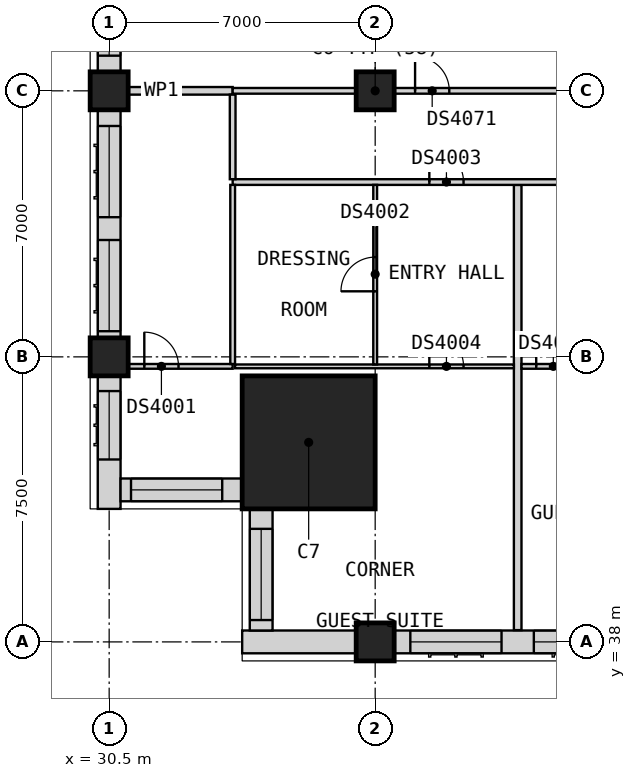
"""IFC4 building model, lengths in metres.
Left out: names, types, materials, properties, quantities, classifications, styles, units other than length and angle.
Written with IfcOpenShell. Run it as: python <this file> out.ifc"""

import sys

from ifc_helpers import new_model, si_unit, direction, frame, frame_2d, origin, origin_2d, place, context, subcontext, project, spatial, rectangle, extrude, element, fill, save


model = new_model("IFC4")
c1 = context("Model", 3, precision=1e-05, world=origin(), true_north=direction((0.0, 1.0)))
c2 = subcontext(c1, "Body", "Model", "MODEL_VIEW")
j1 = project(units=[si_unit("LENGTHUNIT", "METRE"), si_unit("PLANEANGLEUNIT", "RADIAN")], contexts=[c1])
p1 = place(None, origin())
s1 = spatial("IfcSite", under=j1, at=p1, CompositionType="ELEMENT")
p2 = place(p1, origin())
s2 = spatial("IfcBuilding", under=s1, at=p2, CompositionType="ELEMENT")
p3 = place(p2, frame((0.0, 0.0, 141.0)))
s3 = spatial("IfcBuildingStorey", under=s2, at=p3, CompositionType="ELEMENT", Elevation=141.0)
for number, where, z_axis, x_axis in (
    (1, (30.5, 45.5, 0.0), (0.0, 0.0, 1.0), (1.0, 0.0, 0.0)),
    (2, (30.5, 52.5, 0.0), (0.0, 0.0, 1.0), (1.0, 0.0, 0.0)),
    (3, (37.5, 38.0, 0.0), (0.0, 0.0, 1.0), (1.0, 0.0, 0.0)),
    (4, (37.5, 52.5, 0.0), (0.0, 0.0, 1.0), (1.0, 0.0, 0.0)),
):
    element("IfcColumn", number, at=place(p3, frame(where, z_axis=z_axis, x_axis=x_axis)), inside=s3, PredefinedType="COLUMN", context=c2, shape_type="SweptSolid", body=[
        extrude(rectangle(XDim=1.0, YDim=1.0, at=origin_2d()), origin(), (0.0, 0.0, 1.0), 3.6),
    ])
p4 = place(p3, frame((35.75, 43.25, 0.0), z_axis=(0.0, 0.0, 1.0), x_axis=(1.0, 0.0, 0.0)))
e5 = element("IfcColumn", 5, at=p4, inside=s3, PredefinedType="COLUMN", context=c2, shape_type="SweptSolid", body=[
    extrude(rectangle(XDim=3.5, YDim=3.5, at=origin_2d()), origin(), (0.0, 0.0, 1.0), 3.6),
])
p5 = place(p3, frame((34.0, 38.0, 0.0), z_axis=(0.0, 0.0, 1.0), x_axis=(1.0, 0.0, 0.0)))
e6 = element("IfcWall", 6, at=p5, inside=s3, PredefinedType="SOLIDWALL", context=c2, shape_type="SweptSolid", body=[
    extrude(rectangle(XDim=3.0, YDim=0.6, at=frame_2d((1.5, 0.0))), origin(), (0.0, 0.0, 1.0), 3.35),
])
p6 = place(p3, frame((38.0, 38.0, 0.0), z_axis=(0.0, 0.0, 1.0), x_axis=(1.0, 0.0, 0.0)))
e7 = element("IfcWall", 7, at=p6, inside=s3, PredefinedType="SOLIDWALL", context=c2, shape_type="SweptSolid", body=[
    extrude(rectangle(XDim=6.5, YDim=0.6, at=frame_2d((3.25, 0.0))), origin(), (0.0, 0.0, 1.0), 2.85),
])
p7 = place(p6, frame((0.425, 0.0, 0.8)))
e8 = element("IfcOpeningElement", 8, at=p7, cuts=e7, PredefinedType="OPENING", context=c2, shape_type="SweptSolid", body=[
    extrude(rectangle(XDim=2.4, YDim=1.8, at=frame_2d((1.2, 0.9))), frame((0.0, 0.31, 0.0), z_axis=(0.0, -1.0, 0.0), x_axis=(1.0, 0.0, 0.0)), (0.0, 0.0, 1.0), 0.62),
])
p8 = place(p6, frame((3.675, 0.0, 0.8)))
e9 = element("IfcOpeningElement", 9, at=p8, cuts=e7, PredefinedType="OPENING", context=c2, shape_type="SweptSolid", body=[
    extrude(rectangle(XDim=2.4, YDim=1.8, at=frame_2d((1.2, 0.9))), frame((0.0, 0.31, 0.0), z_axis=(0.0, -1.0, 0.0), x_axis=(1.0, 0.0, 0.0)), (0.0, 0.0, 1.0), 0.62),
])
p9 = place(p3, frame((30.5, 60.0, 0.0), z_axis=(0.0, 0.0, 1.0), x_axis=(0.0, -1.0, 0.0)))
e10 = element("IfcWall", 10, at=p9, inside=s3, PredefinedType="SOLIDWALL", context=c2, shape_type="SweptSolid", body=[
    extrude(rectangle(XDim=7.0, YDim=0.6, at=frame_2d((3.5, 0.0))), origin(), (0.0, 0.0, 1.0), 3.35),
])
p10 = place(p9, frame((4.175, 0.0, 0.8)))
e11 = element("IfcOpeningElement", 11, at=p10, cuts=e10, PredefinedType="OPENING", context=c2, shape_type="SweptSolid", body=[
    extrude(rectangle(XDim=2.4, YDim=1.8, at=frame_2d((1.2, 0.9))), frame((0.0, 0.31, 0.0), z_axis=(0.0, -1.0, 0.0), x_axis=(1.0, 0.0, 0.0)), (0.0, 0.0, 1.0), 0.62),
])
p11 = place(p9, frame((0.675, 0.0, 0.8)))
e12 = element("IfcOpeningElement", 12, at=p11, cuts=e10, PredefinedType="OPENING", context=c2, shape_type="SweptSolid", body=[
    extrude(rectangle(XDim=2.4, YDim=1.8, at=frame_2d((1.2, 0.9))), frame((0.0, 0.31, 0.0), z_axis=(0.0, -1.0, 0.0), x_axis=(1.0, 0.0, 0.0)), (0.0, 0.0, 1.0), 0.62),
])
p12 = place(p3, frame((30.5, 52.0, 0.0), z_axis=(0.0, 0.0, 1.0), x_axis=(0.0, -1.0, 0.0)))
e13 = element("IfcWall", 13, at=p12, inside=s3, PredefinedType="SOLIDWALL", context=c2, shape_type="SweptSolid", body=[
    extrude(rectangle(XDim=6.0, YDim=0.6, at=frame_2d((3.0, 0.0))), origin(), (0.0, 0.0, 1.0), 2.85),
])
p13 = place(p12, frame((3.425, 0.0, 0.8)))
e14 = element("IfcOpeningElement", 14, at=p13, cuts=e13, PredefinedType="OPENING", context=c2, shape_type="SweptSolid", body=[
    extrude(rectangle(XDim=2.4, YDim=1.8, at=frame_2d((1.2, 0.9))), frame((0.0, 0.31, 0.0), z_axis=(0.0, -1.0, 0.0), x_axis=(1.0, 0.0, 0.0)), (0.0, 0.0, 1.0), 0.62),
])
p14 = place(p12, frame((0.425, 0.0, 0.8)))
e15 = element("IfcOpeningElement", 15, at=p14, cuts=e13, PredefinedType="OPENING", context=c2, shape_type="SweptSolid", body=[
    extrude(rectangle(XDim=2.4, YDim=1.8, at=frame_2d((1.2, 0.9))), frame((0.0, 0.31, 0.0), z_axis=(0.0, -1.0, 0.0), x_axis=(1.0, 0.0, 0.0)), (0.0, 0.0, 1.0), 0.62),
])
p15 = place(p3, frame((30.5, 45.0, 0.0), z_axis=(0.0, 0.0, 1.0), x_axis=(0.0, -1.0, 0.0)))
e16 = element("IfcWall", 16, at=p15, inside=s3, PredefinedType="SOLIDWALL", context=c2, shape_type="SweptSolid", body=[
    extrude(rectangle(XDim=3.5, YDim=0.6, at=frame_2d((1.75, 0.0))), origin(), (0.0, 0.0, 1.0), 3.35),
])
p16 = place(p15, frame((0.4, 0.0, 0.8)))
e17 = element("IfcOpeningElement", 17, at=p16, cuts=e16, PredefinedType="OPENING", context=c2, shape_type="SweptSolid", body=[
    extrude(rectangle(XDim=1.8, YDim=1.8, at=frame_2d((0.9, 0.9))), frame((0.0, 0.31, 0.0), z_axis=(0.0, -1.0, 0.0), x_axis=(1.0, 0.0, 0.0)), (0.0, 0.0, 1.0), 0.62),
])
p17 = place(p3, frame((30.8, 42.0, 0.0), z_axis=(0.0, 0.0, 1.0), x_axis=(1.0, 0.0, 0.0)))
e18 = element("IfcWall", 18, at=p17, inside=s3, PredefinedType="SOLIDWALL", context=c2, shape_type="SweptSolid", body=[
    extrude(rectangle(XDim=3.2, YDim=0.6, at=frame_2d((1.6, 0.0))), origin(), (0.0, 0.0, 1.0), 3.35),
])
p18 = place(p17, frame((0.275, 0.0, 0.8)))
e19 = element("IfcOpeningElement", 19, at=p18, cuts=e18, PredefinedType="OPENING", context=c2, shape_type="SweptSolid", body=[
    extrude(rectangle(XDim=2.4, YDim=1.8, at=frame_2d((1.2, 0.9))), frame((0.0, 0.31, 0.0), z_axis=(0.0, -1.0, 0.0), x_axis=(1.0, 0.0, 0.0)), (0.0, 0.0, 1.0), 0.62),
])
p19 = place(p3, frame((34.5, 41.5, 0.0), z_axis=(0.0, 0.0, 1.0), x_axis=(0.0, -1.0, 0.0)))
e20 = element("IfcWall", 20, at=p19, inside=s3, PredefinedType="SOLIDWALL", context=c2, shape_type="SweptSolid", body=[
    extrude(rectangle(XDim=3.2, YDim=0.6, at=frame_2d((1.6, 0.0))), origin(), (0.0, 0.0, 1.0), 3.35),
])
p20 = place(p19, frame((0.525, 0.0, 0.8)))
e21 = element("IfcOpeningElement", 21, at=p20, cuts=e20, PredefinedType="OPENING", context=c2, shape_type="SweptSolid", body=[
    extrude(rectangle(XDim=2.4, YDim=1.8, at=frame_2d((1.2, 0.9))), frame((0.0, 0.31, 0.0), z_axis=(0.0, -1.0, 0.0), x_axis=(1.0, 0.0, 0.0)), (0.0, 0.0, 1.0), 0.62),
])
p21 = place(p3, frame((30.0, 52.5, 0.0), z_axis=(0.0, 0.0, 1.0), x_axis=(1.0, 0.0, 0.0)))
e22 = element("IfcWall", 22, at=p21, inside=s3, PredefinedType="PARTITIONING", context=c2, shape_type="SweptSolid", body=[
    extrude(rectangle(XDim=3.75, YDim=0.2, at=frame_2d((1.875, 0.0))), origin(), (0.0, 0.0, 1.0), 3.35),
])
p22 = place(p3, frame((41.25, 38.31, 0.0), z_axis=(0.0, 0.0, 1.0), x_axis=(0.0, 1.0, 0.0)))
e23 = element("IfcWall", 23, at=p22, inside=s3, PredefinedType="PARTITIONING", context=c2, shape_type="SweptSolid", body=[
    extrude(rectangle(XDim=11.715, YDim=0.2, at=frame_2d((5.857, 0.0))), origin(), (0.0, 0.0, 1.0), 3.35),
])
p23 = place(p3, frame((33.75, 50.1, 0.0), z_axis=(0.0, 0.0, 1.0), x_axis=(1.0, 0.0, 0.0)))
e24 = element("IfcWall", 24, at=p23, inside=s3, PredefinedType="PARTITIONING", context=c2, shape_type="SweptSolid", body=[
    extrude(rectangle(XDim=39.9, YDim=0.15, at=frame_2d((19.95, 0.0))), origin(), (0.0, 0.0, 1.0), 3.35),
])
p24 = place(p23, frame((5.175, 0.0, 0.0)))
e25 = element("IfcOpeningElement", 25, at=p24, cuts=e24, PredefinedType="OPENING", context=c2, shape_type="SweptSolid", body=[
    extrude(rectangle(XDim=0.9, YDim=2.1, at=frame_2d((0.45, 1.05))), frame((0.0, 0.085, 0.0), z_axis=(0.0, -1.0, 0.0), x_axis=(1.0, 0.0, 0.0)), (0.0, 0.0, 1.0), 0.17),
])
p25 = place(p23, frame((9.863, 0.0, 0.0)))
e26 = element("IfcOpeningElement", 26, at=p25, cuts=e24, PredefinedType="OPENING", context=c2, shape_type="SweptSolid", body=[
    extrude(rectangle(XDim=0.9, YDim=2.1, at=frame_2d((0.45, 1.05))), frame((0.0, 0.085, 0.0), z_axis=(0.0, -1.0, 0.0), x_axis=(1.0, 0.0, 0.0)), (0.0, 0.0, 1.0), 0.17),
])
p26 = place(p23, frame((13.613, 0.0, 0.0)))
e27 = element("IfcOpeningElement", 27, at=p26, cuts=e24, PredefinedType="OPENING", context=c2, shape_type="SweptSolid", body=[
    extrude(rectangle(XDim=0.9, YDim=2.1, at=frame_2d((0.45, 1.05))), frame((0.0, 0.085, 0.0), z_axis=(0.0, -1.0, 0.0), x_axis=(1.0, 0.0, 0.0)), (0.0, 0.0, 1.0), 0.17),
])
p27 = place(p23, frame((20.688, 0.0, 0.0)))
e28 = element("IfcOpeningElement", 28, at=p27, cuts=e24, PredefinedType="OPENING", context=c2, shape_type="SweptSolid", body=[
    extrude(rectangle(XDim=1.0, YDim=2.1, at=frame_2d((0.5, 1.05))), frame((0.0, 0.085, 0.0), z_axis=(0.0, -1.0, 0.0), x_axis=(1.0, 0.0, 0.0)), (0.0, 0.0, 1.0), 0.17),
])
p28 = place(p23, frame((28.188, 0.0, 0.0)))
e29 = element("IfcOpeningElement", 29, at=p28, cuts=e24, PredefinedType="OPENING", context=c2, shape_type="SweptSolid", body=[
    extrude(rectangle(XDim=1.0, YDim=2.1, at=frame_2d((0.5, 1.05))), frame((0.0, 0.085, 0.0), z_axis=(0.0, -1.0, 0.0), x_axis=(1.0, 0.0, 0.0)), (0.0, 0.0, 1.0), 0.17),
])
p29 = place(p23, frame((32.363, 0.0, 0.0)))
e30 = element("IfcOpeningElement", 30, at=p29, cuts=e24, PredefinedType="OPENING", context=c2, shape_type="SweptSolid", body=[
    extrude(rectangle(XDim=0.9, YDim=2.1, at=frame_2d((0.45, 1.05))), frame((0.0, 0.085, 0.0), z_axis=(0.0, -1.0, 0.0), x_axis=(1.0, 0.0, 0.0)), (0.0, 0.0, 1.0), 0.17),
])
p30 = place(p23, frame((36.113, 0.0, 0.0)))
e31 = element("IfcOpeningElement", 31, at=p30, cuts=e24, PredefinedType="OPENING", context=c2, shape_type="SweptSolid", body=[
    extrude(rectangle(XDim=0.9, YDim=2.1, at=frame_2d((0.45, 1.05))), frame((0.0, 0.085, 0.0), z_axis=(0.0, -1.0, 0.0), x_axis=(1.0, 0.0, 0.0)), (0.0, 0.0, 1.0), 0.17),
])
p31 = place(p23, frame((38.25, 0.0, 0.0)))
e32 = element("IfcOpeningElement", 32, at=p31, cuts=e24, PredefinedType="OPENING", context=c2, shape_type="SweptSolid", body=[
    extrude(rectangle(XDim=0.9, YDim=2.1, at=frame_2d((0.45, 1.05))), frame((0.0, 0.085, 0.0), z_axis=(0.0, -1.0, 0.0), x_axis=(1.0, 0.0, 0.0)), (0.0, 0.0, 1.0), 0.17),
])
p32 = place(p3, frame((33.75, 52.5, 0.0), z_axis=(0.0, 0.0, 1.0), x_axis=(1.0, 0.0, 0.0)))
e33 = element("IfcWall", 33, at=p32, inside=s3, PredefinedType="PARTITIONING", context=c2, shape_type="SweptSolid", body=[
    extrude(rectangle(XDim=17.15, YDim=0.15, at=frame_2d((8.575, 0.0))), origin(), (0.0, 0.0, 1.0), 3.35),
])
p33 = place(p32, frame((4.8, 0.0, 0.0)))
e34 = element("IfcOpeningElement", 34, at=p33, cuts=e33, PredefinedType="OPENING", context=c2, shape_type="SweptSolid", body=[
    extrude(rectangle(XDim=0.9, YDim=2.1, at=frame_2d((0.45, 1.05))), frame((0.0, 0.085, 0.0), z_axis=(0.0, -1.0, 0.0), x_axis=(1.0, 0.0, 0.0)), (0.0, 0.0, 1.0), 0.17),
])
p34 = place(p32, frame((12.3, 0.0, 0.0)))
e35 = element("IfcOpeningElement", 35, at=p34, cuts=e33, PredefinedType="OPENING", context=c2, shape_type="SweptSolid", body=[
    extrude(rectangle(XDim=0.9, YDim=2.1, at=frame_2d((0.45, 1.05))), frame((0.0, 0.085, 0.0), z_axis=(0.0, -1.0, 0.0), x_axis=(1.0, 0.0, 0.0)), (0.0, 0.0, 1.0), 0.17),
])
p35 = place(p32, frame((15.625, 0.0, 0.0)))
e36 = element("IfcOpeningElement", 36, at=p35, cuts=e33, PredefinedType="OPENING", context=c2, shape_type="SweptSolid", body=[
    extrude(rectangle(XDim=0.9, YDim=2.1, at=frame_2d((0.45, 1.05))), frame((0.0, 0.085, 0.0), z_axis=(0.0, -1.0, 0.0), x_axis=(1.0, 0.0, 0.0)), (0.0, 0.0, 1.0), 0.17),
])
p36 = place(p3, frame((33.75, 50.175, 0.0), z_axis=(0.0, 0.0, 1.0), x_axis=(0.0, 1.0, 0.0)))
e37 = element("IfcWall", 37, at=p36, inside=s3, PredefinedType="PARTITIONING", context=c2, shape_type="SweptSolid", body=[
    extrude(rectangle(XDim=2.225, YDim=0.15, at=frame_2d((1.112, 0.0))), origin(), (0.0, 0.0, 1.0), 3.35),
])
p37 = place(p3, frame((33.812, 45.25, 0.0), z_axis=(0.0, 0.0, 1.0), x_axis=(1.0, 0.0, 0.0)))
e38 = element("IfcWall", 38, at=p37, inside=s3, PredefinedType="PARTITIONING", context=c2, shape_type="SweptSolid", body=[
    extrude(rectangle(XDim=7.337, YDim=0.1, at=frame_2d((3.669, 0.0))), origin(), (0.0, 0.0, 1.0), 3.35),
])
p38 = place(p37, frame((5.113, 0.0, 0.0)))
e39 = element("IfcOpeningElement", 39, at=p38, cuts=e38, PredefinedType="OPENING", context=c2, shape_type="SweptSolid", body=[
    extrude(rectangle(XDim=0.9, YDim=2.1, at=frame_2d((0.45, 1.05))), frame((0.0, 0.06, 0.0), z_axis=(0.0, -1.0, 0.0), x_axis=(1.0, 0.0, 0.0)), (0.0, 0.0, 1.0), 0.12),
])
p39 = place(p3, frame((37.5, 45.3, 0.0), z_axis=(0.0, 0.0, 1.0), x_axis=(0.0, 1.0, 0.0)))
e40 = element("IfcWall", 40, at=p39, inside=s3, PredefinedType="PARTITIONING", context=c2, shape_type="SweptSolid", body=[
    extrude(rectangle(XDim=4.725, YDim=0.1, at=frame_2d((2.362, 0.0))), origin(), (0.0, 0.0, 1.0), 3.35),
])
p40 = place(p39, frame((1.925, 0.0, 0.0)))
e41 = element("IfcOpeningElement", 41, at=p40, cuts=e40, PredefinedType="OPENING", context=c2, shape_type="SweptSolid", body=[
    extrude(rectangle(XDim=0.9, YDim=2.1, at=frame_2d((0.45, 1.05))), frame((0.0, 0.06, 0.0), z_axis=(0.0, -1.0, 0.0), x_axis=(1.0, 0.0, 0.0)), (0.0, 0.0, 1.0), 0.12),
])
p41 = place(p3, frame((30.0, 45.25, 0.0), z_axis=(0.0, 0.0, 1.0), x_axis=(1.0, 0.0, 0.0)))
e42 = element("IfcWall", 42, at=p41, inside=s3, PredefinedType="PARTITIONING", context=c2, shape_type="SweptSolid", body=[
    extrude(rectangle(XDim=3.75, YDim=0.125, at=frame_2d((1.875, 0.0))), origin(), (0.0, 0.0, 1.0), 3.35),
])
p42 = place(p41, frame((1.425, 0.0, 0.0)))
e43 = element("IfcOpeningElement", 43, at=p42, cuts=e42, PredefinedType="OPENING", context=c2, shape_type="SweptSolid", body=[
    extrude(rectangle(XDim=0.9, YDim=2.1, at=frame_2d((0.45, 1.05))), frame((0.0, 0.073, 0.0), z_axis=(0.0, -1.0, 0.0), x_axis=(1.0, 0.0, 0.0)), (0.0, 0.0, 1.0), 0.145),
])
p43 = place(p3, frame((41.35, 45.25, 0.0), z_axis=(0.0, 0.0, 1.0), x_axis=(1.0, 0.0, 0.0)))
e44 = element("IfcWall", 44, at=p43, inside=s3, PredefinedType="PARTITIONING", context=c2, shape_type="SweptSolid", body=[
    extrude(rectangle(XDim=1.775, YDim=0.125, at=frame_2d((0.887, 0.0))), origin(), (0.0, 0.0, 1.0), 3.35),
])
p44 = place(p43, frame((0.387, 0.0, 0.0)))
e45 = element("IfcOpeningElement", 45, at=p44, cuts=e44, PredefinedType="OPENING", context=c2, shape_type="SweptSolid", body=[
    extrude(rectangle(XDim=0.9, YDim=2.1, at=frame_2d((0.45, 1.05))), frame((0.0, 0.073, 0.0), z_axis=(0.0, -1.0, 0.0), x_axis=(1.0, 0.0, 0.0)), (0.0, 0.0, 1.0), 0.145),
])
p45 = place(p3, frame((33.75, 45.312, 0.0), z_axis=(0.0, 0.0, 1.0), x_axis=(0.0, 1.0, 0.0)))
e46 = element("IfcWall", 46, at=p45, inside=s3, PredefinedType="PARTITIONING", context=c2, shape_type="SweptSolid", body=[
    extrude(rectangle(XDim=4.712, YDim=0.125, at=frame_2d((2.356, 0.0))), origin(), (0.0, 0.0, 1.0), 3.35),
])
p46 = place(p7, origin())
e47 = element("IfcWindow", 47, at=p46, inside=s3, PartitioningType="SINGLE_PANEL", PredefinedType="WINDOW", context=c2, shape_type="SweptSolid", body=[
    extrude(rectangle(XDim=2.4, YDim=1.8, at=frame_2d((1.2, 0.9))), frame((0.0, -0.07, 0.0), z_axis=(0.0, -1.0, 0.0), x_axis=(1.0, 0.0, 0.0)), (0.0, 0.0, 1.0), 0.06),
])
fill(e8, e47)
p47 = place(p8, origin())
e48 = element("IfcWindow", 48, at=p47, inside=s3, PartitioningType="SINGLE_PANEL", PredefinedType="WINDOW", context=c2, shape_type="SweptSolid", body=[
    extrude(rectangle(XDim=2.4, YDim=1.8, at=frame_2d((1.2, 0.9))), frame((0.0, -0.07, 0.0), z_axis=(0.0, -1.0, 0.0), x_axis=(1.0, 0.0, 0.0)), (0.0, 0.0, 1.0), 0.06),
])
fill(e9, e48)
p48 = place(p10, origin())
e49 = element("IfcWindow", 49, at=p48, inside=s3, PartitioningType="SINGLE_PANEL", PredefinedType="WINDOW", context=c2, shape_type="SweptSolid", body=[
    extrude(rectangle(XDim=2.4, YDim=1.8, at=frame_2d((1.2, 0.9))), frame((0.0, -0.07, 0.0), z_axis=(0.0, -1.0, 0.0), x_axis=(1.0, 0.0, 0.0)), (0.0, 0.0, 1.0), 0.06),
])
fill(e11, e49)
p49 = place(p13, origin())
e50 = element("IfcWindow", 50, at=p49, inside=s3, PartitioningType="SINGLE_PANEL", PredefinedType="WINDOW", context=c2, shape_type="SweptSolid", body=[
    extrude(rectangle(XDim=2.4, YDim=1.8, at=frame_2d((1.2, 0.9))), frame((0.0, -0.07, 0.0), z_axis=(0.0, -1.0, 0.0), x_axis=(1.0, 0.0, 0.0)), (0.0, 0.0, 1.0), 0.06),
])
fill(e14, e50)
p50 = place(p14, origin())
e51 = element("IfcWindow", 51, at=p50, inside=s3, PartitioningType="SINGLE_PANEL", PredefinedType="WINDOW", context=c2, shape_type="SweptSolid", body=[
    extrude(rectangle(XDim=2.4, YDim=1.8, at=frame_2d((1.2, 0.9))), frame((0.0, -0.07, 0.0), z_axis=(0.0, -1.0, 0.0), x_axis=(1.0, 0.0, 0.0)), (0.0, 0.0, 1.0), 0.06),
])
fill(e15, e51)
p51 = place(p16, origin())
e52 = element("IfcWindow", 52, at=p51, inside=s3, PartitioningType="SINGLE_PANEL", PredefinedType="WINDOW", context=c2, shape_type="SweptSolid", body=[
    extrude(rectangle(XDim=1.8, YDim=1.8, at=frame_2d((0.9, 0.9))), frame((0.0, -0.07, 0.0), z_axis=(0.0, -1.0, 0.0), x_axis=(1.0, 0.0, 0.0)), (0.0, 0.0, 1.0), 0.06),
])
fill(e17, e52)
p52 = place(p18, origin())
e53 = element("IfcWindow", 53, at=p52, inside=s3, PartitioningType="SINGLE_PANEL", PredefinedType="WINDOW", context=c2, shape_type="SweptSolid", body=[
    extrude(rectangle(XDim=2.4, YDim=1.8, at=frame_2d((1.2, 0.9))), frame((0.0, -0.07, 0.0), z_axis=(0.0, -1.0, 0.0), x_axis=(1.0, 0.0, 0.0)), (0.0, 0.0, 1.0), 0.06),
])
fill(e19, e53)
p53 = place(p20, origin())
e54 = element("IfcWindow", 54, at=p53, inside=s3, PartitioningType="SINGLE_PANEL", PredefinedType="WINDOW", context=c2, shape_type="SweptSolid", body=[
    extrude(rectangle(XDim=2.4, YDim=1.8, at=frame_2d((1.2, 0.9))), frame((0.0, -0.07, 0.0), z_axis=(0.0, -1.0, 0.0), x_axis=(1.0, 0.0, 0.0)), (0.0, 0.0, 1.0), 0.06),
])
fill(e21, e54)
p54 = place(p42, origin())
e55 = element("IfcDoor", 55, at=p54, inside=s3, OperationType="SINGLE_SWING_LEFT", PredefinedType="DOOR", context=c2, shape_type="SweptSolid", body=[
    extrude(rectangle(XDim=0.9, YDim=2.1, at=frame_2d((0.45, 1.05))), frame((0.0, 0.025, 0.0), z_axis=(0.0, -1.0, 0.0), x_axis=(1.0, 0.0, 0.0)), (0.0, 0.0, 1.0), 0.05),
])
fill(e43, e55)
p55 = place(p40, origin())
e56 = element("IfcDoor", 56, at=p55, inside=s3, OperationType="SINGLE_SWING_RIGHT", PredefinedType="DOOR", context=c2, shape_type="SweptSolid", body=[
    extrude(rectangle(XDim=0.9, YDim=2.1, at=frame_2d((0.45, 1.05))), frame((0.0, 0.025, 0.0), z_axis=(0.0, -1.0, 0.0), x_axis=(1.0, 0.0, 0.0)), (0.0, 0.0, 1.0), 0.05),
])
fill(e41, e56)
p56 = place(p24, origin())
e57 = element("IfcDoor", 57, at=p56, inside=s3, OperationType="SINGLE_SWING_RIGHT", PredefinedType="DOOR", context=c2, shape_type="SweptSolid", body=[
    extrude(rectangle(XDim=0.9, YDim=2.1, at=frame_2d((0.45, 1.05))), frame((0.0, 0.025, 0.0), z_axis=(0.0, -1.0, 0.0), x_axis=(1.0, 0.0, 0.0)), (0.0, 0.0, 1.0), 0.05),
])
fill(e25, e57)
p57 = place(p38, origin())
e58 = element("IfcDoor", 58, at=p57, inside=s3, OperationType="SINGLE_SWING_LEFT", PredefinedType="DOOR", context=c2, shape_type="SweptSolid", body=[
    extrude(rectangle(XDim=0.9, YDim=2.1, at=frame_2d((0.45, 1.05))), frame((0.0, 0.025, 0.0), z_axis=(0.0, -1.0, 0.0), x_axis=(1.0, 0.0, 0.0)), (0.0, 0.0, 1.0), 0.05),
])
fill(e39, e58)
p58 = place(p44, origin())
e59 = element("IfcDoor", 59, at=p58, inside=s3, OperationType="SINGLE_SWING_LEFT", PredefinedType="DOOR", context=c2, shape_type="SweptSolid", body=[
    extrude(rectangle(XDim=0.9, YDim=2.1, at=frame_2d((0.45, 1.05))), frame((0.0, 0.025, 0.0), z_axis=(0.0, -1.0, 0.0), x_axis=(1.0, 0.0, 0.0)), (0.0, 0.0, 1.0), 0.05),
])
fill(e45, e59)
p59 = place(p33, origin())
e60 = element("IfcDoor", 60, at=p59, inside=s3, OperationType="SINGLE_SWING_LEFT", PredefinedType="DOOR", context=c2, shape_type="SweptSolid", body=[
    extrude(rectangle(XDim=0.9, YDim=2.1, at=frame_2d((0.45, 1.05))), frame((0.0, 0.025, 0.0), z_axis=(0.0, -1.0, 0.0), x_axis=(1.0, 0.0, 0.0)), (0.0, 0.0, 1.0), 0.05),
])
fill(e34, e60)
save(model, sys.argv[1])
